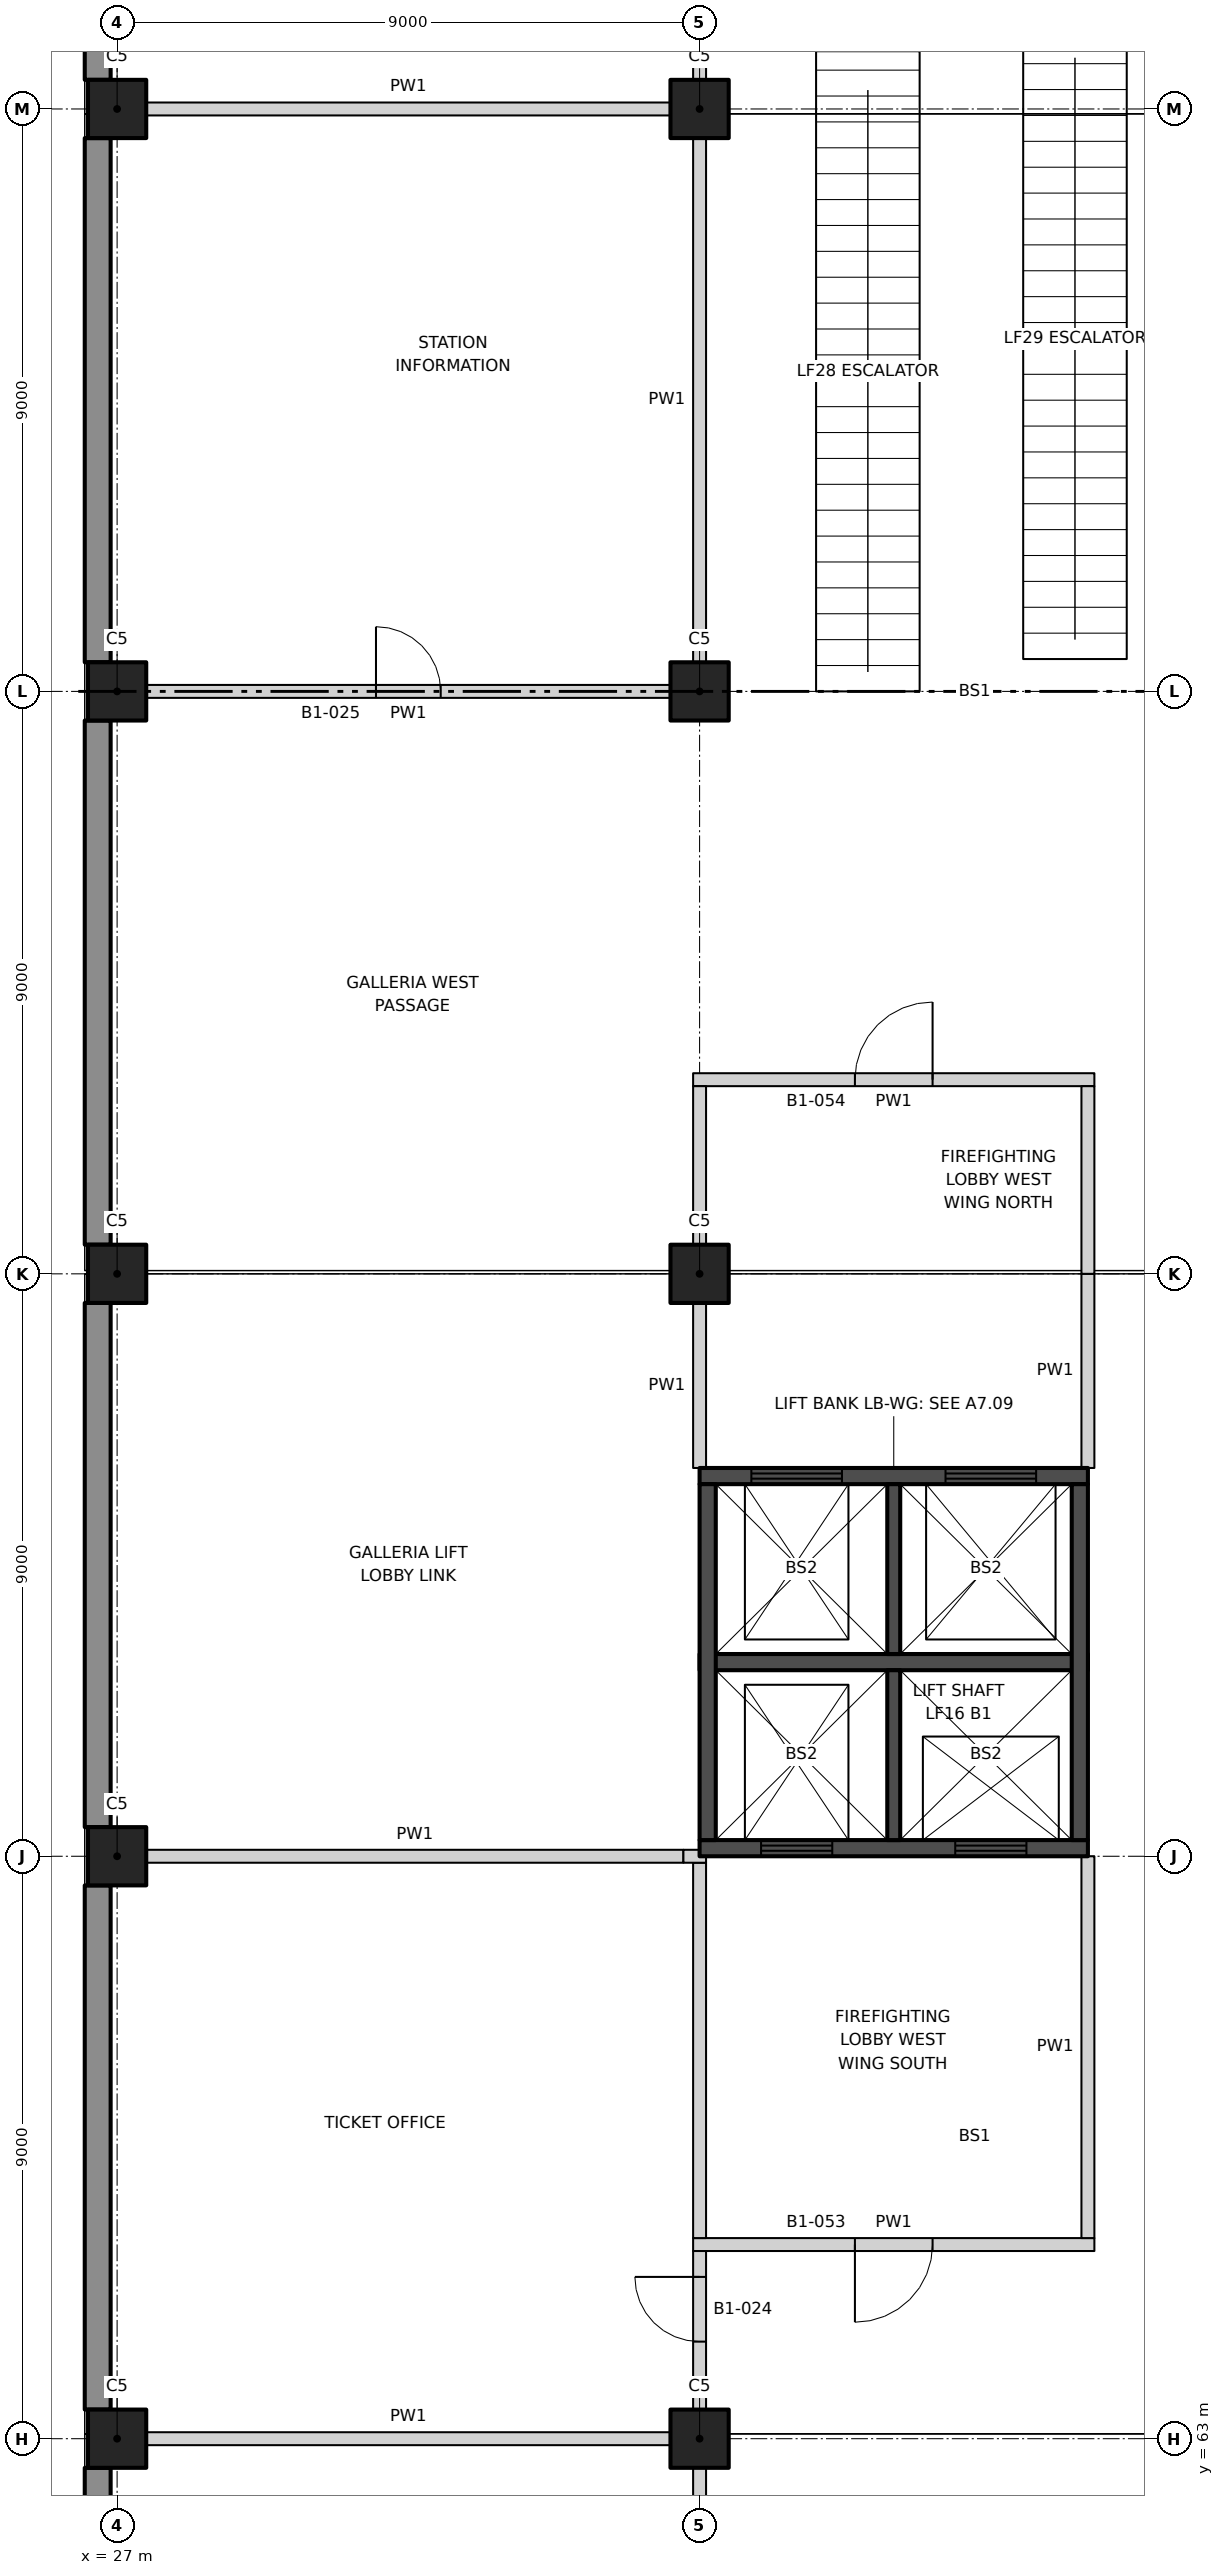
"""IFC4 building model, lengths in metres.
Left out: names, types, materials, properties, quantities, classifications, styles, units other than length and angle.
Written with IfcOpenShell. Run it as: python <this file> out.ifc"""

import sys

from ifc_helpers import new_model, si_unit, direction, frame, frame_2d, origin, origin_2d, place, context, subcontext, project, spatial, rectangle, extrude, element, fill, save


model = new_model("IFC4")
c1 = context("Model", 3, precision=1e-05, world=origin(), true_north=direction((0.0, 1.0)))
c2 = subcontext(c1, "Body", "Model", "MODEL_VIEW")
j1 = project(units=[si_unit("LENGTHUNIT", "METRE"), si_unit("PLANEANGLEUNIT", "RADIAN")], contexts=[c1])
p1 = place(None, origin())
s1 = spatial("IfcSite", under=j1, at=p1, CompositionType="ELEMENT")
p2 = place(p1, origin())
s2 = spatial("IfcBuilding", under=s1, at=p2, CompositionType="ELEMENT")
p3 = place(p2, frame((0.0, 0.0, -6.0)))
s3 = spatial("IfcBuildingStorey", under=s2, at=p3, CompositionType="ELEMENT", Elevation=-6.0)
for number, where, z_axis, x_axis in (
    (1, (27.0, 63.0, 0.0), (0.0, 0.0, 1.0), (1.0, 0.0, 0.0)),
    (2, (27.0, 72.0, 0.0), (0.0, 0.0, 1.0), (1.0, 0.0, 0.0)),
    (3, (27.0, 81.0, 0.0), (0.0, 0.0, 1.0), (1.0, 0.0, 0.0)),
    (4, (27.0, 90.0, 0.0), (0.0, 0.0, 1.0), (1.0, 0.0, 0.0)),
    (5, (27.0, 99.0, 0.0), (0.0, 0.0, 1.0), (1.0, 0.0, 0.0)),
    (6, (36.0, 63.0, 0.0), (0.0, 0.0, 1.0), (1.0, 0.0, 0.0)),
    (7, (36.0, 81.0, 0.0), (0.0, 0.0, 1.0), (1.0, 0.0, 0.0)),
    (8, (36.0, 90.0, 0.0), (0.0, 0.0, 1.0), (1.0, 0.0, 0.0)),
    (9, (36.0, 99.0, 0.0), (0.0, 0.0, 1.0), (1.0, 0.0, 0.0)),
):
    element("IfcColumn", number, at=place(p3, frame(where, z_axis=z_axis, x_axis=x_axis)), inside=s3, PredefinedType="COLUMN", context=c2, shape_type="SweptSolid", body=[
        extrude(rectangle(XDim=0.9, YDim=0.9, at=origin_2d()), origin(), (0.0, 0.0, 1.0), 6.0),
    ])
p4 = place(p3, frame((27.45, 63.0, 0.0), z_axis=(0.0, 0.0, 1.0), x_axis=(1.0, 0.0, 0.0)))
e10 = element("IfcWall", 10, at=p4, inside=s3, PredefinedType="PARTITIONING", context=c2, shape_type="SweptSolid", body=[
    extrude(rectangle(XDim=8.1, YDim=0.2, at=frame_2d((4.05, 0.0))), origin(), (0.0, 0.0, 1.0), 4.65),
])
p5 = place(p3, frame((35.9, 66.0, 0.0), z_axis=(0.0, 0.0, 1.0), x_axis=(1.0, 0.0, 0.0)))
e11 = element("IfcWall", 11, at=p5, inside=s3, PredefinedType="PARTITIONING", context=c2, shape_type="SweptSolid", body=[
    extrude(rectangle(XDim=6.2, YDim=0.2, at=frame_2d((3.1, 0.0))), origin(), (0.0, 0.0, 1.0), 6.0),
])
p6 = place(p5, frame((2.5, 0.0, 0.0)))
e12 = element("IfcOpeningElement", 12, at=p6, cuts=e11, PredefinedType="OPENING", context=c2, shape_type="SweptSolid", body=[
    extrude(rectangle(XDim=1.2, YDim=2.1, at=frame_2d((0.6, 1.05))), frame((0.0, 0.11, 0.0), z_axis=(0.0, -1.0, 0.0), x_axis=(1.0, 0.0, 0.0)), (0.0, 0.0, 1.0), 0.22),
])
p7 = place(p3, frame((27.45, 72.0, 0.0), z_axis=(0.0, 0.0, 1.0), x_axis=(1.0, 0.0, 0.0)))
e13 = element("IfcWall", 13, at=p7, inside=s3, PredefinedType="PARTITIONING", context=c2, shape_type="SweptSolid", body=[
    extrude(rectangle(XDim=8.3, YDim=0.2, at=frame_2d((4.15, 0.0))), origin(), (0.0, 0.0, 1.0), 4.65),
])
p8 = place(p3, frame((35.9, 84.0, 0.0), z_axis=(0.0, 0.0, 1.0), x_axis=(1.0, 0.0, 0.0)))
e14 = element("IfcWall", 14, at=p8, inside=s3, PredefinedType="PARTITIONING", context=c2, shape_type="SweptSolid", body=[
    extrude(rectangle(XDim=6.2, YDim=0.2, at=frame_2d((3.1, 0.0))), origin(), (0.0, 0.0, 1.0), 6.0),
])
p9 = place(p8, frame((2.5, 0.0, 0.0)))
e15 = element("IfcOpeningElement", 15, at=p9, cuts=e14, PredefinedType="OPENING", context=c2, shape_type="SweptSolid", body=[
    extrude(rectangle(XDim=1.2, YDim=2.1, at=frame_2d((0.6, 1.05))), frame((0.0, 0.11, 0.0), z_axis=(0.0, -1.0, 0.0), x_axis=(1.0, 0.0, 0.0)), (0.0, 0.0, 1.0), 0.22),
])
p10 = place(p3, frame((27.45, 90.0, 0.0), z_axis=(0.0, 0.0, 1.0), x_axis=(1.0, 0.0, 0.0)))
e16 = element("IfcWall", 16, at=p10, inside=s3, PredefinedType="PARTITIONING", context=c2, shape_type="SweptSolid", body=[
    extrude(rectangle(XDim=8.1, YDim=0.2, at=frame_2d((4.05, 0.0))), origin(), (0.0, 0.0, 1.0), 4.65),
])
p11 = place(p10, frame((3.55, 0.0, 0.0)))
e17 = element("IfcOpeningElement", 17, at=p11, cuts=e16, PredefinedType="OPENING", context=c2, shape_type="SweptSolid", body=[
    extrude(rectangle(XDim=1.0, YDim=2.1, at=frame_2d((0.5, 1.05))), frame((0.0, 0.11, 0.0), z_axis=(0.0, -1.0, 0.0), x_axis=(1.0, 0.0, 0.0)), (0.0, 0.0, 1.0), 0.22),
])
p12 = place(p3, frame((27.45, 99.0, 0.0), z_axis=(0.0, 0.0, 1.0), x_axis=(1.0, 0.0, 0.0)))
e18 = element("IfcWall", 18, at=p12, inside=s3, PredefinedType="PARTITIONING", context=c2, shape_type="SweptSolid", body=[
    extrude(rectangle(XDim=8.1, YDim=0.2, at=frame_2d((4.05, 0.0))), origin(), (0.0, 0.0, 1.0), 4.65),
])
p13 = place(p3, frame((36.0, 54.45, 0.0), z_axis=(0.0, 0.0, 1.0), x_axis=(0.0, 1.0, 0.0)))
e19 = element("IfcWall", 19, at=p13, inside=s3, PredefinedType="PARTITIONING", context=c2, shape_type="SweptSolid", body=[
    extrude(rectangle(XDim=8.1, YDim=0.2, at=frame_2d((4.05, 0.0))), origin(), (0.0, 0.0, 1.0), 4.65),
])
p14 = place(p13, frame((3.15, 0.0, 0.0)))
e20 = element("IfcOpeningElement", 20, at=p14, cuts=e19, PredefinedType="OPENING", context=c2, shape_type="SweptSolid", body=[
    extrude(rectangle(XDim=1.8, YDim=2.1, at=frame_2d((0.9, 1.05))), frame((0.0, 0.11, 0.0), z_axis=(0.0, -1.0, 0.0), x_axis=(1.0, 0.0, 0.0)), (0.0, 0.0, 1.0), 0.22),
])
p15 = place(p3, frame((36.0, 63.45, 0.0), z_axis=(0.0, 0.0, 1.0), x_axis=(0.0, 1.0, 0.0)))
e21 = element("IfcWall", 21, at=p15, inside=s3, PredefinedType="PARTITIONING", context=c2, shape_type="SweptSolid", body=[
    extrude(rectangle(XDim=2.45, YDim=0.2, at=frame_2d((1.225, 0.0))), origin(), (0.0, 0.0, 1.0), 4.65),
])
p16 = place(p15, frame((1.05, 0.0, 0.0)))
e22 = element("IfcOpeningElement", 22, at=p16, cuts=e21, PredefinedType="OPENING", context=c2, shape_type="SweptSolid", body=[
    extrude(rectangle(XDim=1.0, YDim=2.1, at=frame_2d((0.5, 1.05))), frame((0.0, 0.11, 0.0), z_axis=(0.0, -1.0, 0.0), x_axis=(1.0, 0.0, 0.0)), (0.0, 0.0, 1.0), 0.22),
])
p17 = place(p3, frame((36.0, 66.1, 0.0), z_axis=(0.0, 0.0, 1.0), x_axis=(0.0, 1.0, 0.0)))
e23 = element("IfcWall", 23, at=p17, inside=s3, PredefinedType="PARTITIONING", context=c2, shape_type="SweptSolid", body=[
    extrude(rectangle(XDim=5.8, YDim=0.2, at=frame_2d((2.9, 0.0))), origin(), (0.0, 0.0, 1.0), 4.65),
])
p18 = place(p3, frame((36.0, 78.0, 0.0), z_axis=(0.0, 0.0, 1.0), x_axis=(0.0, 1.0, 0.0)))
e24 = element("IfcWall", 24, at=p18, inside=s3, PredefinedType="PARTITIONING", context=c2, shape_type="SweptSolid", body=[
    extrude(rectangle(XDim=2.55, YDim=0.2, at=frame_2d((1.275, 0.0))), origin(), (0.0, 0.0, 1.0), 4.85),
])
p19 = place(p3, frame((36.0, 81.45, 0.0), z_axis=(0.0, 0.0, 1.0), x_axis=(0.0, 1.0, 0.0)))
e25 = element("IfcWall", 25, at=p19, inside=s3, PredefinedType="PARTITIONING", context=c2, shape_type="SweptSolid", body=[
    extrude(rectangle(XDim=2.45, YDim=0.2, at=frame_2d((1.225, 0.0))), origin(), (0.0, 0.0, 1.0), 4.65),
])
p20 = place(p3, frame((36.0, 90.45, 0.0), z_axis=(0.0, 0.0, 1.0), x_axis=(0.0, 1.0, 0.0)))
e26 = element("IfcWall", 26, at=p20, inside=s3, PredefinedType="PARTITIONING", context=c2, shape_type="SweptSolid", body=[
    extrude(rectangle(XDim=8.1, YDim=0.2, at=frame_2d((4.05, 0.0))), origin(), (0.0, 0.0, 1.0), 4.65),
])
p21 = place(p3, frame((36.0, 99.45, 0.0), z_axis=(0.0, 0.0, 1.0), x_axis=(0.0, 1.0, 0.0)))
e27 = element("IfcWall", 27, at=p21, inside=s3, PredefinedType="PARTITIONING", context=c2, shape_type="SweptSolid", body=[
    extrude(rectangle(XDim=8.1, YDim=0.2, at=frame_2d((4.05, 0.0))), origin(), (0.0, 0.0, 1.0), 4.65),
])
p22 = place(p21, frame((3.15, 0.0, 0.0)))
e28 = element("IfcOpeningElement", 28, at=p22, cuts=e27, PredefinedType="OPENING", context=c2, shape_type="SweptSolid", body=[
    extrude(rectangle(XDim=1.8, YDim=2.1, at=frame_2d((0.9, 1.05))), frame((0.0, 0.11, 0.0), z_axis=(0.0, -1.0, 0.0), x_axis=(1.0, 0.0, 0.0)), (0.0, 0.0, 1.0), 0.22),
])
p23 = place(p3, frame((42.0, 66.1, 0.0), z_axis=(0.0, 0.0, 1.0), x_axis=(0.0, 1.0, 0.0)))
e29 = element("IfcWall", 29, at=p23, inside=s3, PredefinedType="PARTITIONING", context=c2, shape_type="SweptSolid", body=[
    extrude(rectangle(XDim=5.9, YDim=0.2, at=frame_2d((2.95, 0.0))), origin(), (0.0, 0.0, 1.0), 6.0),
])
p24 = place(p3, frame((42.0, 78.0, 0.0), z_axis=(0.0, 0.0, 1.0), x_axis=(0.0, 1.0, 0.0)))
e30 = element("IfcWall", 30, at=p24, inside=s3, PredefinedType="PARTITIONING", context=c2, shape_type="SweptSolid", body=[
    extrude(rectangle(XDim=3.0, YDim=0.2, at=frame_2d((1.5, 0.0))), origin(), (0.0, 0.0, 1.0), 6.0),
])
p25 = place(p3, frame((42.0, 81.0, 0.0), z_axis=(0.0, 0.0, 1.0), x_axis=(0.0, 1.0, 0.0)))
e31 = element("IfcWall", 31, at=p25, inside=s3, PredefinedType="PARTITIONING", context=c2, shape_type="SweptSolid", body=[
    extrude(rectangle(XDim=2.9, YDim=0.2, at=frame_2d((1.45, 0.0))), origin(), (0.0, 0.0, 1.0), 6.0),
])
for number, where, z_axis, x_axis in (
    (32, (26.7, 62.55, 0.0), (0.0, 0.0, 1.0), (0.0, -1.0, 0.0)),
    (33, (26.7, 71.55, 0.0), (0.0, 0.0, 1.0), (0.0, -1.0, 0.0)),
    (34, (26.7, 80.55, 0.0), (0.0, 0.0, 1.0), (0.0, -1.0, 0.0)),
    (35, (26.7, 89.55, 0.0), (0.0, 0.0, 1.0), (0.0, -1.0, 0.0)),
    (36, (26.7, 98.55, 0.0), (0.0, 0.0, 1.0), (0.0, -1.0, 0.0)),
    (37, (26.7, 107.55, 0.0), (0.0, 0.0, 1.0), (0.0, -1.0, 0.0)),
):
    element("IfcWall", number, at=place(p3, frame(where, z_axis=z_axis, x_axis=x_axis)), inside=s3, PredefinedType="SOLIDWALL", context=c2, shape_type="SweptSolid", body=[
        extrude(rectangle(XDim=8.1, YDim=0.4, at=frame_2d((4.05, 0.0))), origin(), (0.0, 0.0, 1.0), 6.0),
    ])
p26 = place(p3, frame((36.0, 72.125, -1.0), z_axis=(0.0, 0.0, 1.0), x_axis=(1.0, 0.0, 0.0)))
e38 = element("IfcWall", 38, at=p26, inside=s3, PredefinedType="SHEAR", context=c2, shape_type="SweptSolid", body=[
    extrude(rectangle(XDim=6.0, YDim=0.25, at=frame_2d((3.0, 0.0))), origin(), (0.0, 0.0, 1.0), 7.0),
])
p27 = place(p26, frame((0.95, 0.0, 1.0)))
e39 = element("IfcOpeningElement", 39, at=p27, cuts=e38, PredefinedType="OPENING", context=c2, shape_type="SweptSolid", body=[
    extrude(rectangle(XDim=1.1, YDim=2.1, at=frame_2d((0.55, 1.05))), frame((0.0, 0.135, 0.0), z_axis=(0.0, -1.0, 0.0), x_axis=(1.0, 0.0, 0.0)), (0.0, 0.0, 1.0), 0.27),
])
p28 = place(p26, frame((3.95, 0.0, 1.0)))
e40 = element("IfcOpeningElement", 40, at=p28, cuts=e38, PredefinedType="OPENING", context=c2, shape_type="SweptSolid", body=[
    extrude(rectangle(XDim=1.1, YDim=2.1, at=frame_2d((0.55, 1.05))), frame((0.0, 0.135, 0.0), z_axis=(0.0, -1.0, 0.0), x_axis=(1.0, 0.0, 0.0)), (0.0, 0.0, 1.0), 0.27),
])
p29 = place(p3, frame((36.0, 77.875, -1.0), z_axis=(0.0, 0.0, 1.0), x_axis=(1.0, 0.0, 0.0)))
e41 = element("IfcWall", 41, at=p29, inside=s3, PredefinedType="SHEAR", context=c2, shape_type="SweptSolid", body=[
    extrude(rectangle(XDim=6.0, YDim=0.25, at=frame_2d((3.0, 0.0))), origin(), (0.0, 0.0, 1.0), 7.0),
])
p30 = place(p29, frame((0.8, 0.0, 1.0)))
e42 = element("IfcOpeningElement", 42, at=p30, cuts=e41, PredefinedType="OPENING", context=c2, shape_type="SweptSolid", body=[
    extrude(rectangle(XDim=1.4, YDim=2.1, at=frame_2d((0.7, 1.05))), frame((0.0, 0.135, 0.0), z_axis=(0.0, -1.0, 0.0), x_axis=(1.0, 0.0, 0.0)), (0.0, 0.0, 1.0), 0.27),
])
p31 = place(p29, frame((3.8, 0.0, 1.0)))
e43 = element("IfcOpeningElement", 43, at=p31, cuts=e41, PredefinedType="OPENING", context=c2, shape_type="SweptSolid", body=[
    extrude(rectangle(XDim=1.4, YDim=2.1, at=frame_2d((0.7, 1.05))), frame((0.0, 0.135, 0.0), z_axis=(0.0, -1.0, 0.0), x_axis=(1.0, 0.0, 0.0)), (0.0, 0.0, 1.0), 0.27),
])
p32 = place(p3, frame((36.0, 75.0, -1.0), z_axis=(0.0, 0.0, 1.0), x_axis=(1.0, 0.0, 0.0)))
e44 = element("IfcWall", 44, at=p32, inside=s3, PredefinedType="SHEAR", context=c2, shape_type="SweptSolid", body=[
    extrude(rectangle(XDim=6.0, YDim=0.25, at=frame_2d((3.0, 0.0))), origin(), (0.0, 0.0, 1.0), 7.0),
])
for number, where, z_axis, x_axis in (
    (45, (36.125, 72.25, -1.0), (0.0, 0.0, 1.0), (0.0, 1.0, 0.0)),
    (46, (41.875, 72.25, -1.0), (0.0, 0.0, 1.0), (0.0, 1.0, 0.0)),
):
    element("IfcWall", number, at=place(p3, frame(where, z_axis=z_axis, x_axis=x_axis)), inside=s3, PredefinedType="SHEAR", context=c2, shape_type="SweptSolid", body=[
        extrude(rectangle(XDim=5.5, YDim=0.25, at=frame_2d((2.75, 0.0))), origin(), (0.0, 0.0, 1.0), 7.0),
    ])
for number, where, z_axis, x_axis in (
    (47, (39.0, 72.25, -1.0), (0.0, 0.0, 1.0), (0.0, 1.0, 0.0)),
    (48, (39.0, 75.125, -1.0), (0.0, 0.0, 1.0), (0.0, 1.0, 0.0)),
):
    element("IfcWall", number, at=place(p3, frame(where, z_axis=z_axis, x_axis=x_axis)), inside=s3, PredefinedType="SHEAR", context=c2, shape_type="SweptSolid", body=[
        extrude(rectangle(XDim=2.625, YDim=0.2, at=frame_2d((1.312, 0.0))), origin(), (0.0, 0.0, 1.0), 7.0),
    ])
p33 = place(p3, frame((35.75, 72.0, 0.0), z_axis=(0.0, 0.0, 1.0), x_axis=(1.0, 0.0, 0.0)))
e49 = element("IfcWall", 49, at=p33, inside=s3, PredefinedType="PARTITIONING", context=c2, shape_type="SweptSolid", body=[
    extrude(rectangle(XDim=0.35, YDim=0.2, at=frame_2d((0.175, 0.0))), origin(), (0.0, 0.0, 1.0), 6.0),
])
p34 = place(p16, origin())
e50 = element("IfcDoor", 50, at=p34, inside=s3, OperationType="SINGLE_SWING_RIGHT", PredefinedType="DOOR", context=c2, shape_type="SweptSolid", body=[
    extrude(rectangle(XDim=1.0, YDim=2.1, at=frame_2d((0.5, 1.05))), frame((0.0, 0.025, 0.0), z_axis=(0.0, -1.0, 0.0), x_axis=(1.0, 0.0, 0.0)), (0.0, 0.0, 1.0), 0.05),
])
fill(e22, e50)
p35 = place(p11, origin())
e51 = element("IfcDoor", 51, at=p35, inside=s3, OperationType="SINGLE_SWING_LEFT", PredefinedType="DOOR", context=c2, shape_type="SweptSolid", body=[
    extrude(rectangle(XDim=1.0, YDim=2.1, at=frame_2d((0.5, 1.05))), frame((0.0, 0.025, 0.0), z_axis=(0.0, -1.0, 0.0), x_axis=(1.0, 0.0, 0.0)), (0.0, 0.0, 1.0), 0.05),
])
fill(e17, e51)
p36 = place(p6, frame((1.2, 0.0, 0.0), z_axis=(0.0, 0.0, 1.0), x_axis=(-1.0, 0.0, 0.0)))
e52 = element("IfcDoor", 52, at=p36, inside=s3, OperationType="SINGLE_SWING_RIGHT", PredefinedType="DOOR", context=c2, shape_type="SweptSolid", body=[
    extrude(rectangle(XDim=1.2, YDim=2.1, at=frame_2d((0.6, 1.05))), frame((0.0, 0.025, 0.0), z_axis=(0.0, -1.0, 0.0), x_axis=(1.0, 0.0, 0.0)), (0.0, 0.0, 1.0), 0.05),
])
fill(e12, e52)
p37 = place(p9, origin())
e53 = element("IfcDoor", 53, at=p37, inside=s3, OperationType="SINGLE_SWING_RIGHT", PredefinedType="DOOR", context=c2, shape_type="SweptSolid", body=[
    extrude(rectangle(XDim=1.2, YDim=2.1, at=frame_2d((0.6, 1.05))), frame((0.0, 0.025, 0.0), z_axis=(0.0, -1.0, 0.0), x_axis=(1.0, 0.0, 0.0)), (0.0, 0.0, 1.0), 0.05),
])
fill(e15, e53)
p38 = place(p27, origin())
e54 = element("IfcDoor", 54, at=p38, inside=s3, OperationType="DOUBLE_DOOR_SLIDING", PredefinedType="DOOR", context=c2, shape_type="SweptSolid", body=[
    extrude(rectangle(XDim=1.1, YDim=2.1, at=frame_2d((0.55, 1.05))), frame((0.0, 0.025, 0.0), z_axis=(0.0, -1.0, 0.0), x_axis=(1.0, 0.0, 0.0)), (0.0, 0.0, 1.0), 0.05),
])
fill(e39, e54)
p39 = place(p28, origin())
e55 = element("IfcDoor", 55, at=p39, inside=s3, OperationType="DOUBLE_DOOR_SLIDING", PredefinedType="DOOR", context=c2, shape_type="SweptSolid", body=[
    extrude(rectangle(XDim=1.1, YDim=2.1, at=frame_2d((0.55, 1.05))), frame((0.0, 0.025, 0.0), z_axis=(0.0, -1.0, 0.0), x_axis=(1.0, 0.0, 0.0)), (0.0, 0.0, 1.0), 0.05),
])
fill(e40, e55)
p40 = place(p30, origin())
e56 = element("IfcDoor", 56, at=p40, inside=s3, OperationType="DOUBLE_DOOR_SLIDING", PredefinedType="DOOR", context=c2, shape_type="SweptSolid", body=[
    extrude(rectangle(XDim=1.4, YDim=2.1, at=frame_2d((0.7, 1.05))), frame((0.0, 0.025, 0.0), z_axis=(0.0, -1.0, 0.0), x_axis=(1.0, 0.0, 0.0)), (0.0, 0.0, 1.0), 0.05),
])
fill(e42, e56)
p41 = place(p31, origin())
e57 = element("IfcDoor", 57, at=p41, inside=s3, OperationType="DOUBLE_DOOR_SLIDING", PredefinedType="DOOR", context=c2, shape_type="SweptSolid", body=[
    extrude(rectangle(XDim=1.4, YDim=2.1, at=frame_2d((0.7, 1.05))), frame((0.0, 0.025, 0.0), z_axis=(0.0, -1.0, 0.0), x_axis=(1.0, 0.0, 0.0)), (0.0, 0.0, 1.0), 0.05),
])
fill(e43, e57)
save(model, sys.argv[1])
